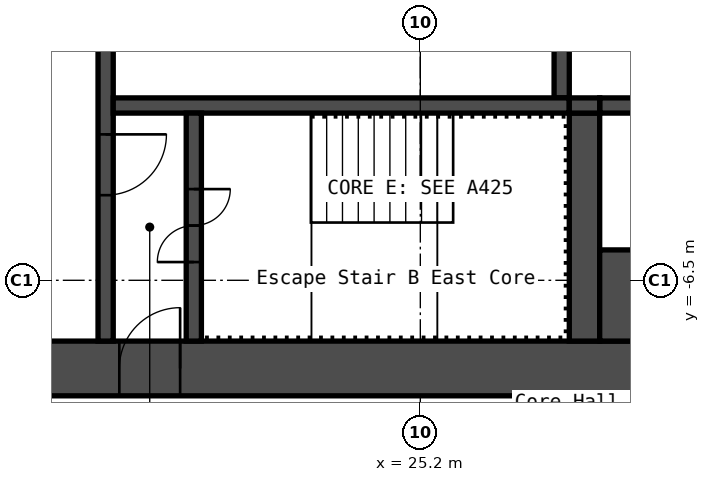
"""IFC4 building model, lengths in metres.
Left out: names, types, materials, properties, quantities, classifications, styles, units other than length and angle.
Written with IfcOpenShell. Run it as: python <this file> out.ifc"""

import sys

from ifc_helpers import new_model, si_unit, direction, frame, frame_2d, origin, place, context, subcontext, project, spatial, rectangle, extrude, element, fill, save


model = new_model("IFC4")
c1 = context("Model", 3, precision=1e-05, world=origin(), true_north=direction((0.0, 1.0)))
c2 = subcontext(c1, "Body", "Model", "MODEL_VIEW")
j1 = project(units=[si_unit("LENGTHUNIT", "METRE"), si_unit("PLANEANGLEUNIT", "RADIAN")], contexts=[c1])
p1 = place(None, origin())
s1 = spatial("IfcSite", under=j1, at=p1, CompositionType="ELEMENT")
p2 = place(p1, origin())
s2 = spatial("IfcBuilding", under=s1, at=p2, CompositionType="ELEMENT")
p3 = place(p2, frame((0.0, 0.0, 172.6)))
s3 = spatial("IfcBuildingStorey", under=s2, at=p3, CompositionType="ELEMENT", Elevation=172.6)
p4 = place(p3, frame((17.7, -7.95, 0.0), z_axis=(0.0, 0.0, 1.0), x_axis=(1.0, 0.0, 0.0)))
e1 = element("IfcWall", 1, at=p4, inside=s3, PredefinedType="SHEAR", context=c2, shape_type="SweptSolid", body=[
    extrude(rectangle(XDim=15.0, YDim=0.9, at=frame_2d((7.5, 0.0))), origin(), (0.0, 0.0, 1.0), 2.9),
])
p5 = place(p4, frame((2.55, 0.0, 0.0)))
e2 = element("IfcOpeningElement", 2, at=p5, cuts=e1, PredefinedType="OPENING", context=c2, shape_type="SweptSolid", body=[
    extrude(rectangle(XDim=1.0, YDim=2.1, at=frame_2d((0.5, 1.05))), frame((0.0, 0.46, 0.0), z_axis=(0.0, -1.0, 0.0), x_axis=(1.0, 0.0, 0.0)), (0.0, 0.0, 1.0), 0.92),
])
p6 = place(p3, frame((20.025, -7.5, 0.0), z_axis=(0.0, 0.0, 1.0), x_axis=(0.0, 1.0, 0.0)))
e3 = element("IfcWall", 3, at=p6, inside=s3, PredefinedType="SHEAR", context=c2, shape_type="SweptSolid", body=[
    extrude(rectangle(XDim=6.3, YDim=0.25, at=frame_2d((3.15, 0.0))), origin(), (0.0, 0.0, 1.0), 2.9),
])
p7 = place(p6, frame((2.4, 0.0, 0.0)))
e4 = element("IfcOpeningElement", 4, at=p7, cuts=e3, PredefinedType="OPENING", context=c2, shape_type="SweptSolid", body=[
    extrude(rectangle(XDim=1.0, YDim=2.1, at=frame_2d((0.5, 1.05))), frame((0.0, 0.135, 0.0), z_axis=(0.0, -1.0, 0.0), x_axis=(1.0, 0.0, 0.0)), (0.0, 0.0, 1.0), 0.27),
])
p8 = place(p3, frame((27.525, -3.5, 0.0), z_axis=(0.0, 0.0, 1.0), x_axis=(0.0, 1.0, 0.0)))
e5 = element("IfcWall", 5, at=p8, inside=s3, PredefinedType="SHEAR", context=c2, shape_type="SweptSolid", body=[
    extrude(rectangle(XDim=2.05, YDim=0.25, at=frame_2d((1.025, 0.0))), origin(), (0.0, 0.0, 1.0), 2.9),
])
p9 = place(p3, frame((20.15, -3.625, 0.0), z_axis=(0.0, 0.0, 1.0), x_axis=(1.0, 0.0, 0.0)))
e6 = element("IfcWall", 6, at=p9, inside=s3, PredefinedType="SHEAR", context=c2, shape_type="SweptSolid", body=[
    extrude(rectangle(XDim=7.5, YDim=0.25, at=frame_2d((3.75, 0.0))), origin(), (0.0, 0.0, 1.0), 2.9),
])
p10 = place(p3, frame((21.475, -7.5, 0.0), z_axis=(0.0, 0.0, 1.0), x_axis=(0.0, 1.0, 0.0)))
e7 = element("IfcWall", 7, at=p10, inside=s3, PredefinedType="SHEAR", context=c2, shape_type="SweptSolid", body=[
    extrude(rectangle(XDim=3.75, YDim=0.25, at=frame_2d((1.875, 0.0))), origin(), (0.0, 0.0, 1.0), 2.9),
])
p11 = place(p10, frame((1.3, 0.0, 0.0)))
e8 = element("IfcOpeningElement", 8, at=p11, cuts=e7, PredefinedType="OPENING", context=c2, shape_type="SweptSolid", body=[
    extrude(rectangle(XDim=1.2, YDim=2.1, at=frame_2d((0.6, 1.05))), frame((0.0, 0.135, 0.0), z_axis=(0.0, -1.0, 0.0), x_axis=(1.0, 0.0, 0.0)), (0.0, 0.0, 1.0), 0.27),
])
p12 = place(p3, frame((27.9, -7.5, 0.0), z_axis=(0.0, 0.0, 1.0), x_axis=(0.0, 1.0, 0.0)))
e9 = element("IfcWall", 9, at=p12, inside=s3, PredefinedType="SHEAR", context=c2, shape_type="SweptSolid", body=[
    extrude(rectangle(XDim=3.75, YDim=0.5, at=frame_2d((1.875, 0.0))), origin(), (0.0, 0.0, 1.0), 2.9),
])
p13 = place(p3, frame((28.15, -3.625, 0.0), z_axis=(0.0, 0.0, 1.0), x_axis=(1.0, 0.0, 0.0)))
e10 = element("IfcWall", 10, at=p13, inside=s3, PredefinedType="SHEAR", context=c2, shape_type="SweptSolid", body=[
    extrude(rectangle(XDim=4.55, YDim=0.25, at=frame_2d((2.275, 0.0))), origin(), (0.0, 0.0, 1.0), 2.9),
])
p14 = place(p3, frame((28.15, -6.75, 0.0), z_axis=(0.0, 0.0, 1.0), x_axis=(1.0, 0.0, 0.0)))
e11 = element("IfcWall", 11, at=p14, inside=s3, PredefinedType="SHEAR", context=c2, shape_type="SweptSolid", body=[
    extrude(rectangle(XDim=4.55, YDim=1.5, at=frame_2d((2.275, 0.0))), origin(), (0.0, 0.0, 1.0), 2.9),
])
p15 = place(p3, frame((27.65, -3.625, 0.0), z_axis=(0.0, 0.0, 1.0), x_axis=(1.0, 0.0, 0.0)))
e12 = element("IfcWall", 12, at=p15, inside=s3, PredefinedType="SHEAR", context=c2, shape_type="SweptSolid", body=[
    extrude(rectangle(XDim=0.5, YDim=0.25, at=frame_2d((0.25, 0.0))), origin(), (0.0, 0.0, 1.0), 2.9),
])
p16 = place(p5, origin())
e13 = element("IfcDoor", 13, at=p16, inside=s3, OperationType="SINGLE_SWING_LEFT", PredefinedType="DOOR", context=c2, shape_type="SweptSolid", body=[
    extrude(rectangle(XDim=1.0, YDim=2.1, at=frame_2d((0.5, 1.05))), frame((0.0, 0.025, 0.0), z_axis=(0.0, -1.0, 0.0), x_axis=(1.0, 0.0, 0.0)), (0.0, 0.0, 1.0), 0.05),
])
fill(e2, e13)
p17 = place(p11, origin())
e14 = element("IfcDoor", 14, at=p17, inside=s3, OperationType="DOUBLE_DOOR_SINGLE_SWING", PredefinedType="DOOR", context=c2, shape_type="SweptSolid", body=[
    extrude(rectangle(XDim=1.2, YDim=2.1, at=frame_2d((0.6, 1.05))), frame((0.0, 0.025, 0.0), z_axis=(0.0, -1.0, 0.0), x_axis=(1.0, 0.0, 0.0)), (0.0, 0.0, 1.0), 0.05),
])
fill(e8, e14)
p18 = place(p7, origin())
e15 = element("IfcDoor", 15, at=p18, inside=s3, OperationType="SINGLE_SWING_RIGHT", PredefinedType="DOOR", context=c2, shape_type="SweptSolid", body=[
    extrude(rectangle(XDim=1.0, YDim=2.1, at=frame_2d((0.5, 1.05))), frame((0.0, 0.025, 0.0), z_axis=(0.0, -1.0, 0.0), x_axis=(1.0, 0.0, 0.0)), (0.0, 0.0, 1.0), 0.05),
])
fill(e4, e15)
save(model, sys.argv[1])
